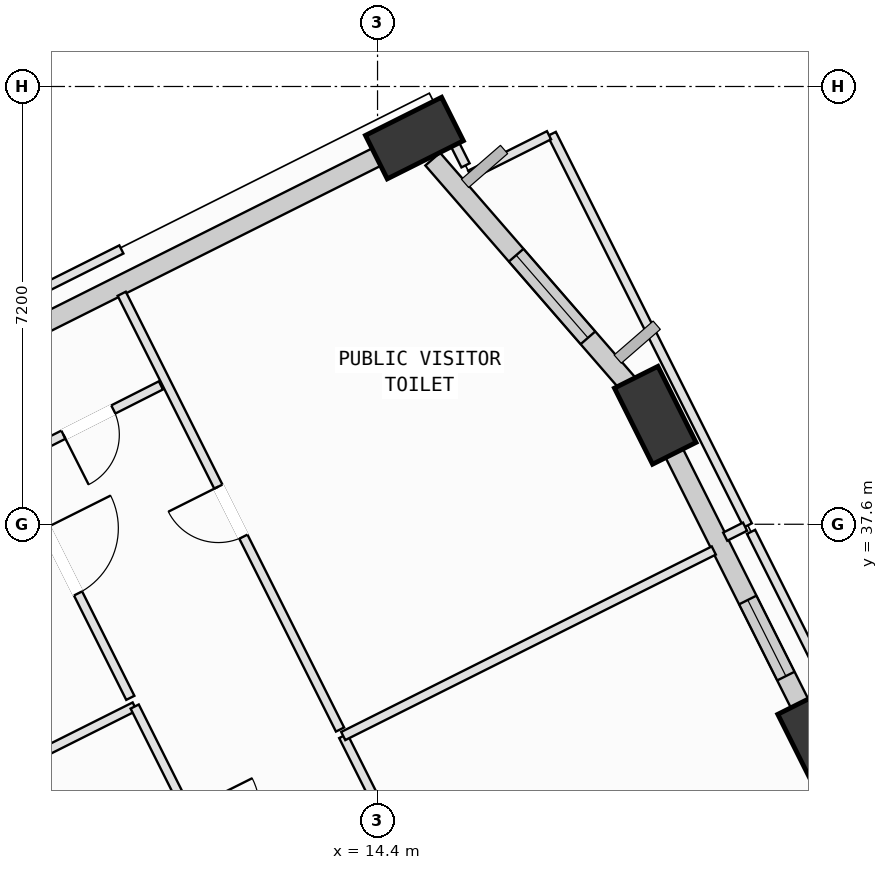
"""IFC4 building model, lengths in metres.
Left out: names, types, materials, properties, quantities, classifications, styles, units other than length and angle.
Written with IfcOpenShell. Run it as: python <this file> out.ifc"""

import sys

from ifc_helpers import new_model, si_unit, direction, frame, frame_2d, origin, origin_2d, place, context, subcontext, project, spatial, rectangle, extrude, element, fill, save


model = new_model("IFC4")
c1 = context("Model", 3, precision=1e-05, world=origin(), true_north=direction((0.0, 1.0)))
c2 = subcontext(c1, "Body", "Model", "MODEL_VIEW")
j1 = project(units=[si_unit("LENGTHUNIT", "METRE"), si_unit("PLANEANGLEUNIT", "RADIAN")], contexts=[c1])
p1 = place(None, origin())
s1 = spatial("IfcSite", under=j1, at=p1, CompositionType="ELEMENT")
p2 = place(p1, origin())
s2 = spatial("IfcBuilding", under=s1, at=p2, CompositionType="ELEMENT")
p3 = place(p2, frame((0.0, 0.0, 136.4)))
s3 = spatial("IfcBuildingStorey", under=s2, at=p3, CompositionType="ELEMENT", Elevation=136.4)
p4 = place(p3, frame((21.654, 34.028, 0.002), z_axis=(-0.037802459463, -0.04975291439, 0.998045901534), x_axis=(0.183369674187, 0.981455024932, 0.055871250433)))
e1 = element("IfcColumn", 1, at=p4, inside=s3, PredefinedType="COLUMN", context=c2, shape_type="SweptSolid", body=[
    extrude(rectangle(XDim=1.4, YDim=0.8, at=origin_2d()), origin(), (0.0, 0.0, 1.0), 4.004),
])
p5 = place(p3, frame((18.967, 39.393, 0.002), z_axis=(-0.059772525944, -0.060929020845, 0.996350791419), x_axis=(0.304258319509, 0.949527435754, 0.076318567594)))
e2 = element("IfcColumn", 2, at=p5, inside=s3, PredefinedType="COLUMN", context=c2, shape_type="SweptSolid", body=[
    extrude(rectangle(XDim=1.4, YDim=0.8, at=origin_2d()), origin(), (0.0, 0.0, 1.0), 4.011),
])
p6 = place(p3, frame((15.006, 43.952, 0.002), z_axis=(-0.078268881294, -0.077236630726, 0.993935855624), x_axis=(0.944827172425, -0.323847816388, 0.049236227186)))
e3 = element("IfcColumn", 3, at=p6, inside=s3, PredefinedType="COLUMN", context=c2, shape_type="SweptSolid", body=[
    extrude(rectangle(XDim=1.4, YDim=0.8, at=origin_2d()), origin(), (0.0, 0.0, 1.0), 4.021),
])
p7 = place(p3, frame((19.202, 38.924, 0.0), z_axis=(0.0, 0.0, 1.0), x_axis=(0.447755250405, -0.894156158473, 0.0)))
e4 = element("IfcWall", 4, at=p7, inside=s3, PredefinedType="SOLIDWALL", context=c2, shape_type="SweptSolid", body=[
    extrude(rectangle(XDim=5.047, YDim=0.32, at=frame_2d((2.524, 0.0))), origin(), (0.0, 0.0, 1.0), 3.165),
])
p8 = place(p7, frame((2.873, 0.0, 0.75)))
e5 = element("IfcOpeningElement", 5, at=p8, cuts=e4, PredefinedType="OPENING", context=c2, shape_type="SweptSolid", body=[
    extrude(rectangle(XDim=1.4, YDim=1.85, at=frame_2d((0.7, 0.925))), frame((0.0, 0.17, 0.0), z_axis=(0.0, -1.0, 0.0), x_axis=(1.0, 0.0, 0.0)), (0.0, 0.0, 1.0), 0.34),
])
p9 = place(p3, frame((15.307, 43.606, 0.0), z_axis=(0.0, 0.0, 1.0), x_axis=(0.655814474574, -0.75492209859, 0.0)))
e6 = element("IfcWall", 6, at=p9, inside=s3, PredefinedType="SOLIDWALL", context=c2, shape_type="SweptSolid", body=[
    extrude(rectangle(XDim=5.129, YDim=0.32, at=frame_2d((2.564, 0.0))), origin(), (0.0, 0.0, 1.0), 3.165),
])
p10 = place(p9, frame((2.094, 0.0, 0.75)))
e7 = element("IfcOpeningElement", 7, at=p10, cuts=e6, PredefinedType="OPENING", context=c2, shape_type="SweptSolid", body=[
    extrude(rectangle(XDim=1.8, YDim=2.05, at=frame_2d((0.9, 1.025))), frame((0.0, 0.17, 0.0), z_axis=(0.0, -1.0, 0.0), x_axis=(1.0, 0.0, 0.0)), (0.0, 0.0, 1.0), 0.34),
])
p11 = place(p3, frame((7.914, 40.4, 0.0), z_axis=(0.0, 0.0, 1.0), x_axis=(0.894156910211, 0.4477537492, 0.0)))
e8 = element("IfcWall", 8, at=p11, inside=s3, PredefinedType="SOLIDWALL", context=c2, shape_type="SweptSolid", body=[
    extrude(rectangle(XDim=7.231, YDim=0.32, at=frame_2d((3.615, 0.0))), origin(), (0.0, 0.0, 1.0), 3.165),
])
p12 = place(p3, frame((0.602, 29.693, 0.0), z_axis=(0.0, 0.0, 1.0), x_axis=(0.894173203887, 0.447721209516, 0.0)))
e9 = element("IfcWall", 9, at=p12, inside=s3, PredefinedType="PARTITIONING", context=c2, shape_type="SweptSolid", body=[
    extrude(rectangle(XDim=10.964, YDim=0.15, at=frame_2d((5.482, 0.0))), origin(), (0.0, 0.0, 1.0), 3.78),
])
p13 = place(p3, frame((10.406, 34.602, 0.0), z_axis=(0.0, 0.0, 1.0), x_axis=(0.447852925086, -0.894107240488, 0.0)))
e10 = element("IfcWall", 10, at=p13, inside=s3, PredefinedType="PARTITIONING", context=c2, shape_type="SweptSolid", body=[
    extrude(rectangle(XDim=5.04, YDim=0.15, at=frame_2d((2.52, 0.0))), origin(), (0.0, 0.0, 1.0), 3.78),
])
p14 = place(p13, frame((1.92, 0.0, 0.0)))
e11 = element("IfcOpeningElement", 11, at=p14, cuts=e10, PredefinedType="OPENING", context=c2, shape_type="SweptSolid", body=[
    extrude(rectangle(XDim=1.2, YDim=2.15, at=frame_2d((0.6, 1.075))), frame((0.0, 0.085, 0.0), z_axis=(0.0, -1.0, 0.0), x_axis=(1.0, 0.0, 0.0)), (0.0, 0.0, 1.0), 0.17),
])
p15 = place(p3, frame((8.078, 39.252, 0.0), z_axis=(0.0, 0.0, 1.0), x_axis=(0.447639822216, -0.894213950666, 0.0)))
e12 = element("IfcWall", 12, at=p15, inside=s3, PredefinedType="PARTITIONING", context=c2, shape_type="SweptSolid", body=[
    extrude(rectangle(XDim=5.04, YDim=0.15, at=frame_2d((2.52, 0.0))), origin(), (0.0, 0.0, 1.0), 2.965),
])
p16 = place(p15, frame((1.92, 0.0, 0.0)))
e13 = element("IfcOpeningElement", 13, at=p16, cuts=e12, PredefinedType="OPENING", context=c2, shape_type="SweptSolid", body=[
    extrude(rectangle(XDim=1.2, YDim=2.15, at=frame_2d((0.6, 1.075))), frame((0.0, 0.085, 0.0), z_axis=(0.0, -1.0, 0.0), x_axis=(1.0, 0.0, 0.0)), (0.0, 0.0, 1.0), 0.17),
])
p17 = place(p3, frame((17.571, 26.66, 0.0), z_axis=(0.0, 0.0, 1.0), x_axis=(-0.447845777943, 0.894110820412, 0.0)))
e14 = element("IfcWall", 14, at=p17, inside=s3, PredefinedType="PARTITIONING", context=c2, shape_type="SweptSolid", body=[
    extrude(rectangle(XDim=8.34, YDim=0.15, at=frame_2d((4.17, 0.0))), origin(), (0.0, 0.0, 1.0), 3.78),
])
p18 = place(p17, frame((3.71, 0.0, 0.0)))
e15 = element("IfcOpeningElement", 15, at=p18, cuts=e14, PredefinedType="OPENING", context=c2, shape_type="SweptSolid", body=[
    extrude(rectangle(XDim=0.92, YDim=2.1, at=frame_2d((0.46, 1.05))), frame((0.0, 0.085, 0.0), z_axis=(0.0, -1.0, 0.0), x_axis=(1.0, 0.0, 0.0)), (0.0, 0.0, 1.0), 0.17),
])
p19 = place(p3, frame((13.836, 34.117, 0.0), z_axis=(0.0, 0.0, 1.0), x_axis=(0.894190630835, 0.447686403331, 0.0)))
e16 = element("IfcWall", 16, at=p19, inside=s3, PredefinedType="PARTITIONING", context=c2, shape_type="SweptSolid", body=[
    extrude(rectangle(XDim=6.815, YDim=0.15, at=frame_2d((3.408, 0.0))), origin(), (0.0, 0.0, 1.0), 3.78),
])
p20 = place(p3, frame((20.543, 37.475, 0.0), z_axis=(0.0, 0.0, 1.0), x_axis=(0.447752163622, -0.894157704195, 0.0)))
e17 = element("IfcWall", 17, at=p20, inside=s3, PredefinedType="PARTITIONING", context=c2, shape_type="SweptSolid", body=[
    extrude(rectangle(XDim=8.34, YDim=0.15, at=frame_2d((4.17, 0.0))), origin(), (0.0, 0.0, 1.0), 3.78),
])
p21 = place(p3, frame((17.265, 44.02, 0.0), z_axis=(0.0, 0.0, 1.0), x_axis=(0.447783151699, -0.894142186151, 0.0)))
e18 = element("IfcWall", 18, at=p21, inside=s3, PredefinedType="PARTITIONING", context=c2, shape_type="SweptSolid", body=[
    extrude(rectangle(XDim=7.2, YDim=0.15, at=frame_2d((3.6, 0.0))), origin(), (0.0, 0.0, 1.0), 3.78),
])
p22 = place(p3, frame((20.444, 37.56, 0.0), z_axis=(0.0, 0.0, 1.0), x_axis=(-0.893354745545, -0.44935208758, 0.0)))
e19 = element("IfcWall", 19, at=p22, inside=s3, PredefinedType="PARTITIONING", context=c2, shape_type="SweptSolid", body=[
    extrude(rectangle(XDim=0.365, YDim=0.15, at=frame_2d((0.183, 0.0))), origin(), (0.0, 0.0, 1.0), 3.78),
])
p23 = place(p3, frame((13.783, 34.224, 0.0), z_axis=(0.0, 0.0, 1.0), x_axis=(-0.447846999207, 0.8941102087, 0.0)))
e20 = element("IfcWall", 20, at=p23, inside=s3, PredefinedType="PARTITIONING", context=c2, shape_type="SweptSolid", body=[
    extrude(rectangle(XDim=8.016, YDim=0.15, at=frame_2d((4.008, 0.0))), origin(), (0.0, 0.0, 1.0), 3.78),
])
p24 = place(p23, frame((3.548, 0.0, 0.0)))
e21 = element("IfcOpeningElement", 21, at=p24, cuts=e20, PredefinedType="OPENING", context=c2, shape_type="SweptSolid", body=[
    extrude(rectangle(XDim=0.92, YDim=2.1, at=frame_2d((0.46, 1.05))), frame((0.0, 0.085, 0.0), z_axis=(0.0, -1.0, 0.0), x_axis=(1.0, 0.0, 0.0)), (0.0, 0.0, 1.0), 0.17),
])
p25 = place(p3, frame((14.294, 43.807, 0.0), z_axis=(0.0, 0.0, 1.0), x_axis=(0.893958659978, 0.448149432947, 0.0)))
e22 = element("IfcWall", 22, at=p25, inside=s3, PredefinedType="PARTITIONING", context=c2, shape_type="SweptSolid", body=[
    extrude(rectangle(XDim=1.252, YDim=0.15, at=frame_2d((0.626, 0.0))), origin(), (0.0, 0.0, 1.0), 3.165),
])
p26 = place(p3, frame((15.435, 44.323, 0.0), z_axis=(0.0, 0.0, 1.0), x_axis=(0.448809122045, -0.893627647272, 0.0)))
e23 = element("IfcWall", 23, at=p26, inside=s3, PredefinedType="PARTITIONING", context=c2, shape_type="SweptSolid", body=[
    extrude(rectangle(XDim=0.918, YDim=0.15, at=frame_2d((0.459, 0.0))), origin(), (0.0, 0.0, 1.0), 3.78),
])
p27 = place(p3, frame((15.924, 43.349, 0.0), z_axis=(0.0, 0.0, 1.0), x_axis=(0.894157501055, 0.447752569292, 0.0)))
e24 = element("IfcWall", 24, at=p27, inside=s3, PredefinedType="PARTITIONING", context=c2, shape_type="SweptSolid", body=[
    extrude(rectangle(XDim=1.449, YDim=0.15, at=frame_2d((0.725, 0.0))), origin(), (0.0, 0.0, 1.0), 3.78),
])
p28 = place(p3, frame((4.652, 39.348, 0.0), z_axis=(0.0, 0.0, 1.0), x_axis=(0.894119355957, 0.447828736575, 0.0)))
e25 = element("IfcWall", 25, at=p28, inside=s3, PredefinedType="PARTITIONING", context=c2, shape_type="SweptSolid", body=[
    extrude(rectangle(XDim=6.19, YDim=0.15, at=frame_2d((3.095, 0.0))), origin(), (0.0, 0.0, 1.0), 3.78),
])
p29 = place(p3, frame((10.837, 39.884, 0.0), z_axis=(0.0, 0.0, 1.0), x_axis=(-0.892317330031, -0.451408664655, 0.0)))
e26 = element("IfcWall", 26, at=p29, inside=s3, PredefinedType="PARTITIONING", context=c2, shape_type="SweptSolid", body=[
    extrude(rectangle(XDim=2.674, YDim=0.15, at=frame_2d((1.337, 0.0))), origin(), (0.0, 0.0, 1.0), 3.78),
])
p30 = place(p29, frame((0.877, 0.0, 0.0)))
e27 = element("IfcOpeningElement", 27, at=p30, cuts=e26, PredefinedType="OPENING", context=c2, shape_type="SweptSolid", body=[
    extrude(rectangle(XDim=0.92, YDim=2.1, at=frame_2d((0.46, 1.05))), frame((0.0, 0.085, 0.0), z_axis=(0.0, -1.0, 0.0), x_axis=(1.0, 0.0, 0.0)), (0.0, 0.0, 1.0), 0.17),
])
p31 = place(p8, origin())
e28 = element("IfcWindow", 28, at=p31, inside=s3, PartitioningType="SINGLE_PANEL", PredefinedType="WINDOW", context=c2, shape_type="SweptSolid", body=[
    extrude(rectangle(XDim=1.4, YDim=1.85, at=frame_2d((0.7, 0.925))), frame((0.0, 0.03, 0.0), z_axis=(0.0, -1.0, 0.0), x_axis=(1.0, 0.0, 0.0)), (0.0, 0.0, 1.0), 0.06),
])
fill(e5, e28)
p32 = place(p10, origin())
e29 = element("IfcWindow", 29, at=p32, inside=s3, PartitioningType="SINGLE_PANEL", PredefinedType="WINDOW", context=c2, shape_type="SweptSolid", body=[
    extrude(rectangle(XDim=1.8, YDim=2.05, at=frame_2d((0.9, 1.025))), frame((0.0, 0.03, 0.0), z_axis=(0.0, -1.0, 0.0), x_axis=(1.0, 0.0, 0.0)), (0.0, 0.0, 1.0), 0.06),
])
fill(e7, e29)
p33 = place(p16, origin())
e30 = element("IfcDoor", 30, at=p33, inside=s3, OperationType="SINGLE_SWING_LEFT", PredefinedType="DOOR", context=c2, shape_type="SweptSolid", body=[
    extrude(rectangle(XDim=1.2, YDim=2.15, at=frame_2d((0.6, 1.075))), frame((0.0, 0.025, 0.0), z_axis=(0.0, -1.0, 0.0), x_axis=(1.0, 0.0, 0.0)), (0.0, 0.0, 1.0), 0.05),
])
fill(e13, e30)
p34 = place(p24, origin())
e31 = element("IfcDoor", 31, at=p34, inside=s3, OperationType="SINGLE_SWING_RIGHT", PredefinedType="DOOR", context=c2, shape_type="SweptSolid", body=[
    extrude(rectangle(XDim=0.92, YDim=2.1, at=frame_2d((0.46, 1.05))), frame((0.0, 0.025, 0.0), z_axis=(0.0, -1.0, 0.0), x_axis=(1.0, 0.0, 0.0)), (0.0, 0.0, 1.0), 0.05),
])
fill(e21, e31)
p35 = place(p30, origin())
e32 = element("IfcDoor", 32, at=p35, inside=s3, OperationType="SINGLE_SWING_RIGHT", PredefinedType="DOOR", context=c2, shape_type="SweptSolid", body=[
    extrude(rectangle(XDim=0.92, YDim=2.1, at=frame_2d((0.46, 1.05))), frame((0.0, 0.025, 0.0), z_axis=(0.0, -1.0, 0.0), x_axis=(1.0, 0.0, 0.0)), (0.0, 0.0, 1.0), 0.05),
])
fill(e27, e32)
save(model, sys.argv[1])
